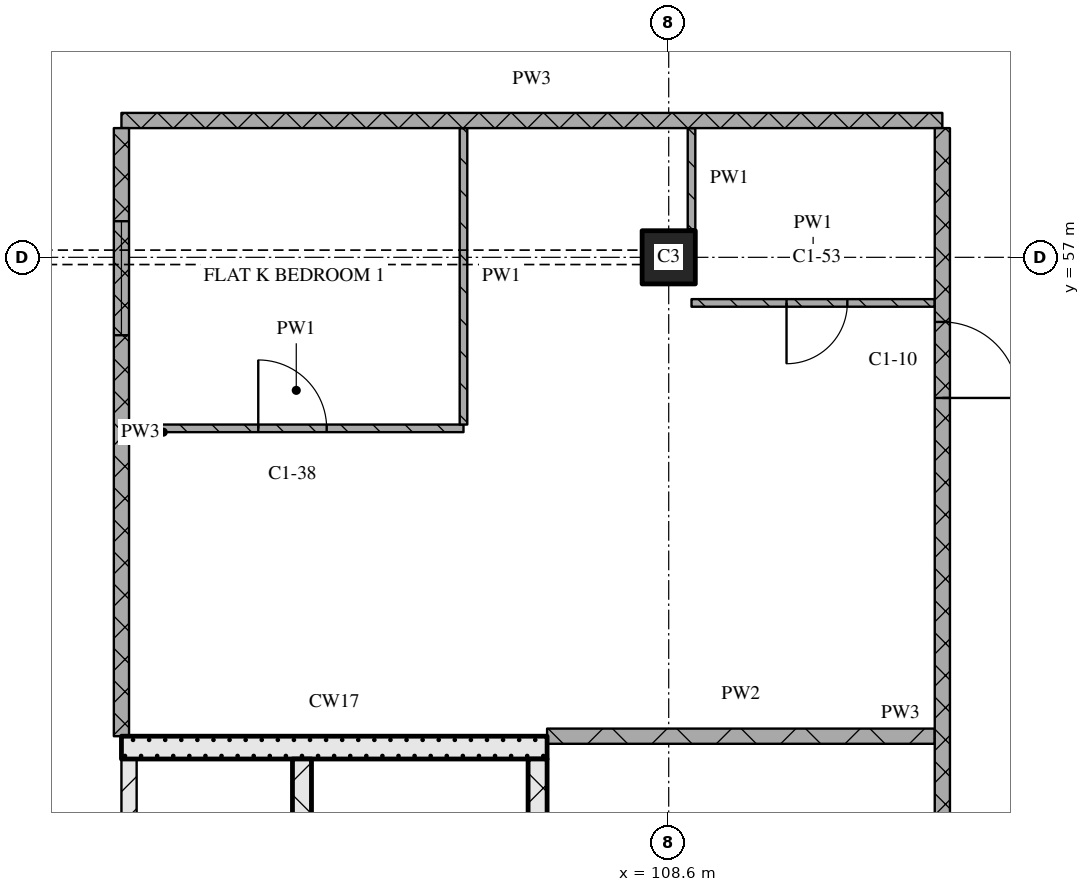
"""IFC4 building model, lengths in metres.
Left out: names, types, materials, properties, quantities, classifications, styles, units other than length and angle.
Written with IfcOpenShell. Run it as: python <this file> out.ifc"""

import sys

from ifc_helpers import new_model, si_unit, direction, frame, frame_2d, origin, origin_2d, place, context, subcontext, project, spatial, rectangle, extrude, element, fill, save


model = new_model("IFC4")
c1 = context("Model", 3, precision=1e-05, world=origin(), true_north=direction((0.0, 1.0)))
c2 = subcontext(c1, "Body", "Model", "MODEL_VIEW")
j1 = project(units=[si_unit("LENGTHUNIT", "METRE"), si_unit("PLANEANGLEUNIT", "RADIAN")], contexts=[c1])
p1 = place(None, origin())
s1 = spatial("IfcSite", under=j1, at=p1, CompositionType="ELEMENT")
p2 = place(p1, origin())
s2 = spatial("IfcBuilding", under=s1, at=p2, CompositionType="ELEMENT")
p3 = place(p2, frame((0.0, 0.0, 147.45)))
s3 = spatial("IfcBuildingStorey", under=s2, at=p3, CompositionType="ELEMENT", Elevation=147.45)
p4 = place(p3, frame((108.6, 57.0, 0.0), z_axis=(0.0, 0.0, 1.0), x_axis=(1.0, 0.0, 0.0)))
e1 = element("IfcColumn", 1, at=p4, inside=s3, PredefinedType="COLUMN", context=c2, shape_type="SweptSolid", body=[
    extrude(rectangle(XDim=0.7, YDim=0.7, at=origin_2d()), origin(), (0.0, 0.0, 1.0), 3.6),
])
p5 = place(p3, frame((101.5, 43.5, 0.0), z_axis=(0.0, 0.0, 1.0), x_axis=(0.0, 1.0, 0.0)))
e2 = element("IfcWall", 2, at=p5, inside=s3, PredefinedType="PARTITIONING", context=c2, shape_type="SweptSolid", body=[
    extrude(rectangle(XDim=6.9, YDim=0.2, at=frame_2d((3.45, 0.0))), origin(), (0.0, 0.0, 1.0), 3.32),
])
p6 = place(p5, frame((1.0, 0.0, 0.0)))
e3 = element("IfcOpeningElement", 3, at=p6, cuts=e2, PredefinedType="OPENING", context=c2, shape_type="SweptSolid", body=[
    extrude(rectangle(XDim=1.0, YDim=2.1, at=frame_2d((0.5, 1.05))), frame((0.0, 0.11, 0.0), z_axis=(0.0, -1.0, 0.0), x_axis=(1.0, 0.0, 0.0)), (0.0, 0.0, 1.0), 0.22),
])
p7 = place(p3, frame((103.775, 43.5, 0.0), z_axis=(0.0, 0.0, 1.0), x_axis=(0.0, 1.0, 0.0)))
e4 = element("IfcWall", 4, at=p7, inside=s3, PredefinedType="SOLIDWALL", context=c2, shape_type="SweptSolid", body=[
    extrude(rectangle(XDim=6.9, YDim=0.25, at=frame_2d((3.45, 0.0))), origin(), (0.0, 0.0, 1.0), 3.32),
])
p8 = place(p7, frame((0.2, 0.0, 0.0)))
e5 = element("IfcOpeningElement", 5, at=p8, cuts=e4, PredefinedType="OPENING", context=c2, shape_type="SweptSolid", body=[
    extrude(rectangle(XDim=1.0, YDim=2.1, at=frame_2d((0.5, 1.05))), frame((0.0, 0.135, 0.0), z_axis=(0.0, -1.0, 0.0), x_axis=(1.0, 0.0, 0.0)), (0.0, 0.0, 1.0), 0.27),
])
p9 = place(p3, frame((106.875, 43.5, 0.0), z_axis=(0.0, 0.0, 1.0), x_axis=(0.0, 1.0, 0.0)))
e6 = element("IfcWall", 6, at=p9, inside=s3, PredefinedType="SOLIDWALL", context=c2, shape_type="SweptSolid", body=[
    extrude(rectangle(XDim=6.9, YDim=0.25, at=frame_2d((3.45, 0.0))), origin(), (0.0, 0.0, 1.0), 3.32),
])
p10 = place(p3, frame((101.4, 50.55, 0.0), z_axis=(0.0, 0.0, 1.0), x_axis=(1.0, 0.0, 0.0)))
e7 = element("IfcWall", 7, at=p10, inside=s3, PredefinedType="SOLIDWALL", context=c2, shape_type="SweptSolid", body=[
    extrude(rectangle(XDim=5.6, YDim=0.3, at=frame_2d((2.8, 0.0))), origin(), (0.0, 0.0, 1.0), 3.32),
])
p11 = place(p3, frame((107.0, 50.7, 0.0), z_axis=(0.0, 0.0, 1.0), x_axis=(1.0, 0.0, 0.0)))
e8 = element("IfcWall", 8, at=p11, inside=s3, PredefinedType="PARTITIONING", context=c2, shape_type="SweptSolid", body=[
    extrude(rectangle(XDim=5.1, YDim=0.2, at=frame_2d((2.55, 0.0))), origin(), (0.0, 0.0, 1.0), 3.32),
])
p12 = place(p3, frame((101.5, 54.75, 0.0), z_axis=(0.0, 0.0, 1.0), x_axis=(1.0, 0.0, 0.0)))
e9 = element("IfcWall", 9, at=p12, inside=s3, PredefinedType="PARTITIONING", context=c2, shape_type="SweptSolid", body=[
    extrude(rectangle(XDim=4.4, YDim=0.1, at=frame_2d((2.2, 0.0))), origin(), (0.0, 0.0, 1.0), 3.32),
])
p13 = place(p12, frame((1.7, 0.0, 0.0)))
e10 = element("IfcOpeningElement", 10, at=p13, cuts=e9, PredefinedType="OPENING", context=c2, shape_type="SweptSolid", body=[
    extrude(rectangle(XDim=0.9, YDim=2.1, at=frame_2d((0.45, 1.05))), frame((0.0, 0.06, 0.0), z_axis=(0.0, -1.0, 0.0), x_axis=(1.0, 0.0, 0.0)), (0.0, 0.0, 1.0), 0.12),
])
p14 = place(p3, frame((108.9, 56.4, 0.0), z_axis=(0.0, 0.0, 1.0), x_axis=(1.0, 0.0, 0.0)))
e11 = element("IfcWall", 11, at=p14, inside=s3, PredefinedType="PARTITIONING", context=c2, shape_type="SweptSolid", body=[
    extrude(rectangle(XDim=3.2, YDim=0.1, at=frame_2d((1.6, 0.0))), origin(), (0.0, 0.0, 1.0), 3.32),
])
p15 = place(p14, frame((1.25, 0.0, 0.0)))
e12 = element("IfcOpeningElement", 12, at=p15, cuts=e11, PredefinedType="OPENING", context=c2, shape_type="SweptSolid", body=[
    extrude(rectangle(XDim=0.8, YDim=2.1, at=frame_2d((0.4, 1.05))), frame((0.0, 0.06, 0.0), z_axis=(0.0, -1.0, 0.0), x_axis=(1.0, 0.0, 0.0)), (0.0, 0.0, 1.0), 0.12),
])
p16 = place(p3, frame((101.4, 58.8, 0.0), z_axis=(0.0, 0.0, 1.0), x_axis=(1.0, 0.0, 0.0)))
e13 = element("IfcWall", 13, at=p16, inside=s3, PredefinedType="PARTITIONING", context=c2, shape_type="SweptSolid", body=[
    extrude(rectangle(XDim=10.8, YDim=0.2, at=frame_2d((5.4, 0.0))), origin(), (0.0, 0.0, 1.0), 3.32),
])
p17 = place(p3, frame((101.4, 58.7, 0.0), z_axis=(0.0, 0.0, 1.0), x_axis=(0.0, -1.0, 0.0)))
e14 = element("IfcWall", 14, at=p17, inside=s3, PredefinedType="PARTITIONING", context=c2, shape_type="SweptSolid", body=[
    extrude(rectangle(XDim=8.0, YDim=0.2, at=frame_2d((4.0, 0.0))), origin(), (0.0, 0.0, 1.0), 3.32),
])
p18 = place(p17, frame((1.225, 0.0, 0.9)))
e15 = element("IfcOpeningElement", 15, at=p18, cuts=e14, PredefinedType="OPENING", context=c2, shape_type="SweptSolid", body=[
    extrude(rectangle(XDim=1.5, YDim=1.5, at=frame_2d((0.75, 0.75))), frame((0.0, 0.11, 0.0), z_axis=(0.0, -1.0, 0.0), x_axis=(1.0, 0.0, 0.0)), (0.0, 0.0, 1.0), 0.22),
])
p19 = place(p3, frame((105.9, 58.7, 0.0), z_axis=(0.0, 0.0, 1.0), x_axis=(0.0, -1.0, 0.0)))
e16 = element("IfcWall", 16, at=p19, inside=s3, PredefinedType="PARTITIONING", context=c2, shape_type="SweptSolid", body=[
    extrude(rectangle(XDim=3.9, YDim=0.1, at=frame_2d((1.95, 0.0))), origin(), (0.0, 0.0, 1.0), 3.32),
])
p20 = place(p3, frame((108.9, 58.7, 0.0), z_axis=(0.0, 0.0, 1.0), x_axis=(0.0, -1.0, 0.0)))
e17 = element("IfcWall", 17, at=p20, inside=s3, PredefinedType="PARTITIONING", context=c2, shape_type="SweptSolid", body=[
    extrude(rectangle(XDim=1.33, YDim=0.1, at=frame_2d((0.665, 0.0))), origin(), (0.0, 0.0, 1.0), 3.32),
])
p21 = place(p3, frame((112.2, 43.3, 0.0), z_axis=(0.0, 0.0, 1.0), x_axis=(0.0, 1.0, 0.0)))
e18 = element("IfcWall", 18, at=p21, inside=s3, PredefinedType="PARTITIONING", context=c2, shape_type="SweptSolid", body=[
    extrude(rectangle(XDim=15.4, YDim=0.2, at=frame_2d((7.7, 0.0))), origin(), (0.0, 0.0, 1.0), 3.32),
])
p22 = place(p21, frame((11.85, 0.0, 0.0)))
e19 = element("IfcOpeningElement", 19, at=p22, cuts=e18, PredefinedType="OPENING", context=c2, shape_type="SweptSolid", body=[
    extrude(rectangle(XDim=1.0, YDim=2.1, at=frame_2d((0.5, 1.05))), frame((0.0, 0.11, 0.0), z_axis=(0.0, -1.0, 0.0), x_axis=(1.0, 0.0, 0.0)), (0.0, 0.0, 1.0), 0.22),
])
p23 = place(p13, origin())
e20 = element("IfcDoor", 20, at=p23, inside=s3, OperationType="SINGLE_SWING_LEFT", PredefinedType="DOOR", context=c2, shape_type="SweptSolid", body=[
    extrude(rectangle(XDim=0.9, YDim=2.1, at=frame_2d((0.45, 1.05))), frame((0.0, 0.025, 0.0), z_axis=(0.0, -1.0, 0.0), x_axis=(1.0, 0.0, 0.0)), (0.0, 0.0, 1.0), 0.05),
])
fill(e10, e20)
p24 = place(p15, origin())
e21 = element("IfcDoor", 21, at=p24, inside=s3, OperationType="SINGLE_SWING_RIGHT", PredefinedType="DOOR", context=c2, shape_type="SweptSolid", body=[
    extrude(rectangle(XDim=0.8, YDim=2.1, at=frame_2d((0.4, 1.05))), frame((0.0, 0.025, 0.0), z_axis=(0.0, -1.0, 0.0), x_axis=(1.0, 0.0, 0.0)), (0.0, 0.0, 1.0), 0.05),
])
fill(e12, e21)
p25 = place(p22, origin())
e22 = element("IfcDoor", 22, at=p25, inside=s3, OperationType="SINGLE_SWING_RIGHT", PredefinedType="DOOR", context=c2, shape_type="SweptSolid", body=[
    extrude(rectangle(XDim=1.0, YDim=2.1, at=frame_2d((0.5, 1.05))), frame((0.0, 0.025, 0.0), z_axis=(0.0, -1.0, 0.0), x_axis=(1.0, 0.0, 0.0)), (0.0, 0.0, 1.0), 0.05),
])
fill(e19, e22)
p26 = place(p18, origin())
e23 = element("IfcWindow", 23, at=p26, inside=s3, PartitioningType="SINGLE_PANEL", PredefinedType="WINDOW", context=c2, shape_type="SweptSolid", body=[
    extrude(rectangle(XDim=1.5, YDim=1.5, at=frame_2d((0.75, 0.75))), frame((0.0, 0.03, 0.0), z_axis=(0.0, -1.0, 0.0), x_axis=(1.0, 0.0, 0.0)), (0.0, 0.0, 1.0), 0.06),
])
fill(e15, e23)
save(model, sys.argv[1])
